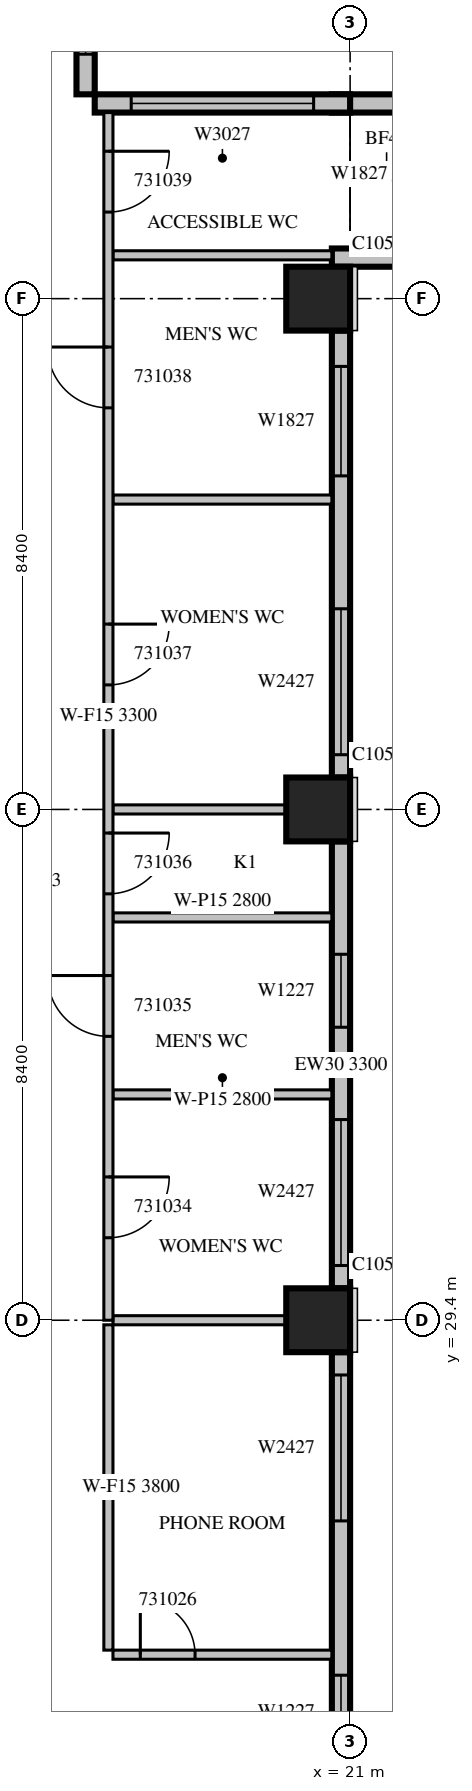
"""IFC4 building model, lengths in metres.
Left out: names, types, materials, properties, quantities, classifications, styles, units other than length and angle.
Written with IfcOpenShell. Run it as: python <this file> out.ifc"""

import sys

from ifc_helpers import new_model, si_unit, direction, frame, frame_2d, origin, origin_2d, place, context, subcontext, project, spatial, rectangle, extrude, source, transform, mapped, element, fill, save


model = new_model("IFC4")
c1 = context("Model", 3, precision=1e-05, world=origin(), true_north=direction((0.0, 1.0)))
c2 = subcontext(c1, "Body", "Model", "MODEL_VIEW")
j1 = project(units=[si_unit("LENGTHUNIT", "METRE"), si_unit("PLANEANGLEUNIT", "RADIAN")], contexts=[c1])
p1 = place(None, origin())
s1 = spatial("IfcSite", under=j1, at=p1, CompositionType="ELEMENT")
p2 = place(p1, origin())
s2 = spatial("IfcBuilding", under=s1, at=p2, CompositionType="ELEMENT")
p3 = place(p2, frame((0.0, 0.0, 141.3)))
s3 = spatial("IfcBuildingStorey", under=s2, at=p3, CompositionType="ELEMENT", Elevation=141.3)
m1 = source(origin(), c2, "Body", "SweptSolid", [
    extrude(rectangle(XDim=1.05, YDim=1.05, at=origin_2d()), origin(), (0.0, 0.0, 1.0), 4.2),
])
for number, where, z_axis, x_axis in (
    (1, (20.475, 29.4, 0.0), (0.0, 0.0, 1.0), (1.0, 0.0, 0.0)),
    (2, (20.475, 37.8, 0.0), (0.0, 0.0, 1.0), (1.0, 0.0, 0.0)),
    (3, (20.475, 46.2, 0.0), (0.0, 0.0, 1.0), (1.0, 0.0, 0.0)),
):
    element("IfcColumn", number, at=place(p3, frame(where, z_axis=z_axis, x_axis=x_axis)), inside=s3, PredefinedType="COLUMN", context=c2, shape_type="MappedRepresentation", body=[
        mapped(m1, transform((0.0, 0.0, 0.0), scale=1.0)),
    ])
m2 = source(origin(), c2, "Body", "SweptSolid", [
    extrude(rectangle(XDim=6.875, YDim=0.3, at=frame_2d((3.438, 0.0))), origin(), (0.0, 0.0, 1.0), 3.8),
])
p4 = place(p3, frame((20.85, 22.0, 0.0), z_axis=(0.0, 0.0, 1.0), x_axis=(0.0, 1.0, 0.0)))
e4 = element("IfcWall", 4, at=p4, inside=s3, PredefinedType="STANDARD", context=c2, shape_type="MappedRepresentation", body=[
    mapped(m2, transform((0.0, 0.0, 0.0), scale=1.0)),
])
m3 = source(origin(), c2, "Body", "SweptSolid", [
    extrude(rectangle(XDim=1.2, YDim=2.7, at=frame_2d((0.6, 1.35))), frame((0.0, 0.16, 0.0), z_axis=(0.0, -1.0, 0.0), x_axis=(1.0, 0.0, 0.0)), (0.0, 0.0, 1.0), 0.32),
])
p5 = place(p4, frame((0.362, 0.0, 0.6)))
e5 = element("IfcOpeningElement", 5, at=p5, cuts=e4, PredefinedType="OPENING", context=c2, shape_type="MappedRepresentation", body=[
    mapped(m3, transform((0.0, 0.0, 0.0), scale=1.0)),
])
m4 = source(origin(), c2, "Body", "SweptSolid", [
    extrude(rectangle(XDim=2.4, YDim=2.7, at=frame_2d((1.2, 1.35))), frame((0.0, 0.16, 0.0), z_axis=(0.0, -1.0, 0.0), x_axis=(1.0, 0.0, 0.0)), (0.0, 0.0, 1.0), 0.32),
])
p6 = place(p4, frame((4.1, 0.0, 0.6)))
e6 = element("IfcOpeningElement", 6, at=p6, cuts=e4, PredefinedType="OPENING", context=c2, shape_type="MappedRepresentation", body=[
    mapped(m4, transform((0.0, 0.0, 0.0), scale=1.0)),
])
m5 = source(origin(), c2, "Body", "SweptSolid", [
    extrude(rectangle(XDim=7.35, YDim=0.3, at=frame_2d((3.675, 0.0))), origin(), (0.0, 0.0, 1.0), 3.3),
])
p7 = place(p3, frame((20.85, 29.925, 0.0), z_axis=(0.0, 0.0, 1.0), x_axis=(0.0, 1.0, 0.0)))
e7 = element("IfcWall", 7, at=p7, inside=s3, PredefinedType="STANDARD", context=c2, shape_type="MappedRepresentation", body=[
    mapped(m5, transform((0.0, 0.0, 0.0), scale=1.0)),
])
p8 = place(p7, frame((0.375, 0.0, 0.6)))
e8 = element("IfcOpeningElement", 8, at=p8, cuts=e7, PredefinedType="OPENING", context=c2, shape_type="MappedRepresentation", body=[
    mapped(m4, transform((0.0, 0.0, 0.0), scale=1.0)),
])
p9 = place(p7, frame((4.293, 0.0, 0.6)))
e9 = element("IfcOpeningElement", 9, at=p9, cuts=e7, PredefinedType="OPENING", context=c2, shape_type="MappedRepresentation", body=[
    mapped(m3, transform((0.0, 0.0, 0.0), scale=1.0)),
])
m6 = source(origin(), c2, "Body", "SweptSolid", [
    extrude(rectangle(XDim=7.35, YDim=0.3, at=frame_2d((3.675, 0.0))), origin(), (0.0, 0.0, 1.0), 3.8),
])
p10 = place(p3, frame((20.85, 38.325, 0.0), z_axis=(0.0, 0.0, 1.0), x_axis=(0.0, 1.0, 0.0)))
e10 = element("IfcWall", 10, at=p10, inside=s3, PredefinedType="STANDARD", context=c2, shape_type="MappedRepresentation", body=[
    mapped(m6, transform((0.0, 0.0, 0.0), scale=1.0)),
])
p11 = place(p10, frame((0.375, 0.0, 0.6)))
e11 = element("IfcOpeningElement", 11, at=p11, cuts=e10, PredefinedType="OPENING", context=c2, shape_type="MappedRepresentation", body=[
    mapped(m4, transform((0.0, 0.0, 0.0), scale=1.0)),
])
m7 = source(origin(), c2, "Body", "SweptSolid", [
    extrude(rectangle(XDim=1.8, YDim=2.7, at=frame_2d((0.9, 1.35))), frame((0.0, 0.16, 0.0), z_axis=(0.0, -1.0, 0.0), x_axis=(1.0, 0.0, 0.0)), (0.0, 0.0, 1.0), 0.32),
])
p12 = place(p10, frame((4.96, 0.0, 0.6)))
e12 = element("IfcOpeningElement", 12, at=p12, cuts=e10, PredefinedType="OPENING", context=c2, shape_type="MappedRepresentation", body=[
    mapped(m7, transform((0.0, 0.0, 0.0), scale=1.0)),
])
m8 = source(origin(), c2, "Body", "SweptSolid", [
    extrude(rectangle(XDim=1.2, YDim=0.3, at=frame_2d((0.6, 0.0))), origin(), (0.0, 0.0, 1.0), 3.8),
])
for number, where, z_axis, x_axis in (
    (13, (20.7, 46.875, 0.0), (0.0, 0.0, 1.0), (1.0, 0.0, 0.0)),
    (14, (20.7, 49.41, 0.0), (0.0, 0.0, 1.0), (1.0, 0.0, 0.0)),
):
    element("IfcWall", number, at=place(p3, frame(where, z_axis=z_axis, x_axis=x_axis)), inside=s3, PredefinedType="STANDARD", context=c2, shape_type="MappedRepresentation", body=[
        mapped(m8, transform((0.0, 0.0, 0.0), scale=1.0)),
    ])
m9 = source(origin(), c2, "Body", "SweptSolid", [
    extrude(rectangle(XDim=4.2, YDim=0.3, at=frame_2d((2.1, 0.0))), origin(), (0.0, 0.0, 1.0), 3.8),
])
p13 = place(p3, frame((21.0, 49.41, 0.0), z_axis=(0.0, 0.0, 1.0), x_axis=(-1.0, 0.0, 0.0)))
e15 = element("IfcWall", 15, at=p13, inside=s3, PredefinedType="STANDARD", context=c2, shape_type="MappedRepresentation", body=[
    mapped(m9, transform((0.0, 0.0, 0.0), scale=1.0)),
])
m10 = source(origin(), c2, "Body", "SweptSolid", [
    extrude(rectangle(XDim=3.0, YDim=2.7, at=frame_2d((1.5, 1.35))), frame((0.0, 0.16, 0.0), z_axis=(0.0, -1.0, 0.0), x_axis=(1.0, 0.0, 0.0)), (0.0, 0.0, 1.0), 0.32),
])
p14 = place(p13, frame((0.6, 0.0, 0.6)))
e16 = element("IfcOpeningElement", 16, at=p14, cuts=e15, PredefinedType="OPENING", context=c2, shape_type="MappedRepresentation", body=[
    mapped(m10, transform((0.0, 0.0, 0.0), scale=1.0)),
])
m11 = source(origin(), c2, "Body", "SweptSolid", [
    extrude(rectangle(XDim=2.52, YDim=0.3, at=frame_2d((1.26, 0.0))), origin(), (0.0, 0.0, 1.0), 3.8),
])
p15 = place(p3, frame((16.65, 49.56, 0.0), z_axis=(0.0, 0.0, 1.0), x_axis=(0.0, 1.0, 0.0)))
e17 = element("IfcWall", 17, at=p15, inside=s3, PredefinedType="STANDARD", context=c2, shape_type="MappedRepresentation", body=[
    mapped(m11, transform((0.0, 0.0, 0.0), scale=1.0)),
])
p16 = place(p15, frame((0.66, 0.0, 0.6)))
e18 = element("IfcOpeningElement", 18, at=p16, cuts=e17, PredefinedType="OPENING", context=c2, shape_type="MappedRepresentation", body=[
    mapped(m3, transform((0.0, 0.0, 0.0), scale=1.0)),
])
m12 = source(origin(), c2, "Body", "SweptSolid", [
    extrude(rectangle(XDim=3.6, YDim=0.15, at=frame_2d((1.8, 0.0))), origin(), (0.0, 0.0, 1.0), 3.8),
])
p17 = place(p3, frame((17.1, 23.9, 0.0), z_axis=(0.0, 0.0, 1.0), x_axis=(1.0, 0.0, 0.0)))
e19 = element("IfcWall", 19, at=p17, inside=s3, PredefinedType="PARTITIONING", context=c2, shape_type="MappedRepresentation", body=[
    mapped(m12, transform((0.0, 0.0, 0.0), scale=1.0)),
])
m13 = source(origin(), c2, "Body", "SweptSolid", [
    extrude(rectangle(XDim=0.9, YDim=2.1, at=frame_2d((0.45, 1.05))), frame((0.0, 0.085, 0.0), z_axis=(0.0, -1.0, 0.0), x_axis=(1.0, 0.0, 0.0)), (0.0, 0.0, 1.0), 0.17),
])
p18 = place(p17, frame((0.45, 0.0, 0.0)))
e20 = element("IfcOpeningElement", 20, at=p18, cuts=e19, PredefinedType="OPENING", context=c2, shape_type="MappedRepresentation", body=[
    mapped(m13, transform((0.0, 0.0, 0.0), scale=1.0)),
])
m14 = source(origin(), c2, "Body", "SweptSolid", [
    extrude(rectangle(XDim=5.35, YDim=0.15, at=frame_2d((2.675, 0.0))), origin(), (0.0, 0.0, 1.0), 3.8),
])
p19 = place(p3, frame((17.025, 29.325, 0.0), z_axis=(0.0, 0.0, 1.0), x_axis=(0.0, -1.0, 0.0)))
e21 = element("IfcWall", 21, at=p19, inside=s3, PredefinedType="PARTITIONING", context=c2, shape_type="MappedRepresentation", body=[
    mapped(m14, transform((0.0, 0.0, 0.0), scale=1.0)),
])
m15 = source(origin(), c2, "Body", "SweptSolid", [
    extrude(rectangle(XDim=2.851, YDim=0.15, at=frame_2d((1.425, 0.0))), origin(), (0.0, 0.0, 1.0), 3.8),
])
p20 = place(p3, frame((19.951, 29.4, 0.0), z_axis=(0.0, 0.0, 1.0), x_axis=(-1.0, 0.0, 0.0)))
e22 = element("IfcWall", 22, at=p20, inside=s3, PredefinedType="PARTITIONING", context=c2, shape_type="MappedRepresentation", body=[
    mapped(m15, transform((0.0, 0.0, 0.0), scale=1.0)),
])
m16 = source(origin(), c2, "Body", "SweptSolid", [
    extrude(rectangle(XDim=3.6, YDim=0.15, at=frame_2d((1.8, 0.0))), origin(), (0.0, 0.0, 1.0), 2.8),
])
for number, where, z_axis, x_axis in (
    (23, (17.1, 33.113, 0.0), (0.0, 0.0, 1.0), (1.0, 0.0, 0.0)),
    (24, (17.1, 36.024, 0.0), (0.0, 0.0, 1.0), (1.0, 0.0, 0.0)),
):
    element("IfcWall", number, at=place(p3, frame(where, z_axis=z_axis, x_axis=x_axis)), inside=s3, PredefinedType="PARTITIONING", context=c2, shape_type="MappedRepresentation", body=[
        mapped(m16, transform((0.0, 0.0, 0.0), scale=1.0)),
    ])
for number, where, z_axis, x_axis in (
    (25, (17.1, 42.896, 0.0), (0.0, 0.0, 1.0), (1.0, 0.0, 0.0)),
    (26, (17.1, 46.913, 0.0), (0.0, 0.0, 1.0), (1.0, 0.0, 0.0)),
):
    element("IfcWall", number, at=place(p3, frame(where, z_axis=z_axis, x_axis=x_axis)), inside=s3, PredefinedType="PARTITIONING", context=c2, shape_type="MappedRepresentation", body=[
        mapped(m12, transform((0.0, 0.0, 0.0), scale=1.0)),
    ])
p21 = place(p3, frame((19.951, 37.8, 0.0), z_axis=(0.0, 0.0, 1.0), x_axis=(-1.0, 0.0, 0.0)))
e27 = element("IfcWall", 27, at=p21, inside=s3, PredefinedType="PARTITIONING", context=c2, shape_type="MappedRepresentation", body=[
    mapped(m15, transform((0.0, 0.0, 0.0), scale=1.0)),
])
m17 = source(origin(), c2, "Body", "SweptSolid", [
    extrude(rectangle(XDim=19.86, YDim=0.15, at=frame_2d((9.93, 0.0))), origin(), (0.0, 0.0, 1.0), 3.3),
])
p22 = place(p3, frame((17.025, 49.26, 0.0), z_axis=(0.0, 0.0, 1.0), x_axis=(0.0, -1.0, 0.0)))
e28 = element("IfcWall", 28, at=p22, inside=s3, PredefinedType="PARTITIONING", context=c2, shape_type="MappedRepresentation", body=[
    mapped(m17, transform((0.0, 0.0, 0.0), scale=1.0)),
])
m18 = source(origin(), c2, "Body", "SweptSolid", [
    extrude(rectangle(XDim=1.0, YDim=2.1, at=frame_2d((0.5, 1.05))), frame((0.0, 0.085, 0.0), z_axis=(0.0, -1.0, 0.0), x_axis=(1.0, 0.0, 0.0)), (0.0, 0.0, 1.0), 0.17),
])
p23 = place(p22, frame((17.503, 0.0, 0.0)))
e29 = element("IfcOpeningElement", 29, at=p23, cuts=e28, PredefinedType="OPENING", context=c2, shape_type="MappedRepresentation", body=[
    mapped(m18, transform((0.0, 0.0, 0.0), scale=1.0)),
])
p24 = place(p22, frame((14.191, 0.0, 0.0)))
e30 = element("IfcOpeningElement", 30, at=p24, cuts=e28, PredefinedType="OPENING", context=c2, shape_type="MappedRepresentation", body=[
    mapped(m18, transform((0.0, 0.0, 0.0), scale=1.0)),
])
p25 = place(p22, frame((11.848, 0.0, 0.0)))
e31 = element("IfcOpeningElement", 31, at=p25, cuts=e28, PredefinedType="OPENING", context=c2, shape_type="MappedRepresentation", body=[
    mapped(m18, transform((0.0, 0.0, 0.0), scale=1.0)),
])
p26 = place(p22, frame((8.412, 0.0, 0.0)))
e32 = element("IfcOpeningElement", 32, at=p26, cuts=e28, PredefinedType="OPENING", context=c2, shape_type="MappedRepresentation", body=[
    mapped(m18, transform((0.0, 0.0, 0.0), scale=1.0)),
])
p27 = place(p22, frame((3.856, 0.0, 0.0)))
e33 = element("IfcOpeningElement", 33, at=p27, cuts=e28, PredefinedType="OPENING", context=c2, shape_type="MappedRepresentation", body=[
    mapped(m18, transform((0.0, 0.0, 0.0), scale=1.0)),
])
p28 = place(p22, frame((0.636, 0.0, 0.0)))
e34 = element("IfcOpeningElement", 34, at=p28, cuts=e28, PredefinedType="OPENING", context=c2, shape_type="MappedRepresentation", body=[
    mapped(m18, transform((0.0, 0.0, 0.0), scale=1.0)),
])
m19 = source(origin(), c2, "Body", "SweptSolid", [
    extrude(rectangle(XDim=1.2, YDim=2.7, at=frame_2d((0.6, 1.35))), frame((0.0, 0.03, 0.0), z_axis=(0.0, -1.0, 0.0), x_axis=(1.0, 0.0, 0.0)), (0.0, 0.0, 1.0), 0.06),
])
p29 = place(p5, origin())
e35 = element("IfcWindow", 35, at=p29, inside=s3, PartitioningType="SINGLE_PANEL", PredefinedType="WINDOW", context=c2, shape_type="MappedRepresentation", body=[
    mapped(m19, transform((0.0, 0.0, 0.0), scale=1.0)),
])
fill(e5, e35)
m20 = source(origin(), c2, "Body", "SweptSolid", [
    extrude(rectangle(XDim=2.4, YDim=2.7, at=frame_2d((1.2, 1.35))), frame((0.0, 0.03, 0.0), z_axis=(0.0, -1.0, 0.0), x_axis=(1.0, 0.0, 0.0)), (0.0, 0.0, 1.0), 0.06),
])
p30 = place(p6, origin())
e36 = element("IfcWindow", 36, at=p30, inside=s3, PartitioningType="SINGLE_PANEL", PredefinedType="WINDOW", context=c2, shape_type="MappedRepresentation", body=[
    mapped(m20, transform((0.0, 0.0, 0.0), scale=1.0)),
])
fill(e6, e36)
p31 = place(p8, origin())
e37 = element("IfcWindow", 37, at=p31, inside=s3, PartitioningType="SINGLE_PANEL", PredefinedType="WINDOW", context=c2, shape_type="MappedRepresentation", body=[
    mapped(m20, transform((0.0, 0.0, 0.0), scale=1.0)),
])
fill(e8, e37)
p32 = place(p9, origin())
e38 = element("IfcWindow", 38, at=p32, inside=s3, PartitioningType="SINGLE_PANEL", PredefinedType="WINDOW", context=c2, shape_type="MappedRepresentation", body=[
    mapped(m19, transform((0.0, 0.0, 0.0), scale=1.0)),
])
fill(e9, e38)
p33 = place(p11, origin())
e39 = element("IfcWindow", 39, at=p33, inside=s3, PartitioningType="SINGLE_PANEL", PredefinedType="WINDOW", context=c2, shape_type="MappedRepresentation", body=[
    mapped(m20, transform((0.0, 0.0, 0.0), scale=1.0)),
])
fill(e11, e39)
m21 = source(origin(), c2, "Body", "SweptSolid", [
    extrude(rectangle(XDim=1.8, YDim=2.7, at=frame_2d((0.9, 1.35))), frame((0.0, 0.03, 0.0), z_axis=(0.0, -1.0, 0.0), x_axis=(1.0, 0.0, 0.0)), (0.0, 0.0, 1.0), 0.06),
])
p34 = place(p12, origin())
e40 = element("IfcWindow", 40, at=p34, inside=s3, PartitioningType="SINGLE_PANEL", PredefinedType="WINDOW", context=c2, shape_type="MappedRepresentation", body=[
    mapped(m21, transform((0.0, 0.0, 0.0), scale=1.0)),
])
fill(e12, e40)
m22 = source(origin(), c2, "Body", "SweptSolid", [
    extrude(rectangle(XDim=3.0, YDim=2.7, at=frame_2d((1.5, 1.35))), frame((0.0, 0.03, 0.0), z_axis=(0.0, -1.0, 0.0), x_axis=(1.0, 0.0, 0.0)), (0.0, 0.0, 1.0), 0.06),
])
p35 = place(p14, origin())
e41 = element("IfcWindow", 41, at=p35, inside=s3, PartitioningType="SINGLE_PANEL", PredefinedType="WINDOW", context=c2, shape_type="MappedRepresentation", body=[
    mapped(m22, transform((0.0, 0.0, 0.0), scale=1.0)),
])
fill(e16, e41)
p36 = place(p16, origin())
e42 = element("IfcWindow", 42, at=p36, inside=s3, PartitioningType="SINGLE_PANEL", PredefinedType="WINDOW", context=c2, shape_type="MappedRepresentation", body=[
    mapped(m19, transform((0.0, 0.0, 0.0), scale=1.0)),
])
fill(e18, e42)
m23 = source(origin(), c2, "Body", "SweptSolid", [
    extrude(rectangle(XDim=0.9, YDim=2.1, at=frame_2d((0.45, 1.05))), frame((0.0, 0.025, 0.0), z_axis=(0.0, -1.0, 0.0), x_axis=(1.0, 0.0, 0.0)), (0.0, 0.0, 1.0), 0.05),
])
p37 = place(p18, origin())
e43 = element("IfcDoor", 43, at=p37, inside=s3, OperationType="SINGLE_SWING_LEFT", PredefinedType="DOOR", context=c2, shape_type="MappedRepresentation", body=[
    mapped(m23, transform((0.0, 0.0, 0.0), scale=1.0)),
])
fill(e20, e43)
m24 = source(origin(), c2, "Body", "SweptSolid", [
    extrude(rectangle(XDim=1.0, YDim=2.1, at=frame_2d((0.5, 1.05))), frame((0.0, 0.025, 0.0), z_axis=(0.0, -1.0, 0.0), x_axis=(1.0, 0.0, 0.0)), (0.0, 0.0, 1.0), 0.05),
])
p38 = place(p23, origin())
e44 = element("IfcDoor", 44, at=p38, inside=s3, OperationType="SINGLE_SWING_LEFT", PredefinedType="DOOR", context=c2, shape_type="MappedRepresentation", body=[
    mapped(m24, transform((0.0, 0.0, 0.0), scale=1.0)),
])
fill(e29, e44)
p39 = place(p24, origin())
e45 = element("IfcDoor", 45, at=p39, inside=s3, OperationType="SINGLE_SWING_RIGHT", PredefinedType="DOOR", context=c2, shape_type="MappedRepresentation", body=[
    mapped(m24, transform((0.0, 0.0, 0.0), scale=1.0)),
])
fill(e30, e45)
p40 = place(p25, origin())
e46 = element("IfcDoor", 46, at=p40, inside=s3, OperationType="SINGLE_SWING_LEFT", PredefinedType="DOOR", context=c2, shape_type="MappedRepresentation", body=[
    mapped(m24, transform((0.0, 0.0, 0.0), scale=1.0)),
])
fill(e31, e46)
p41 = place(p26, origin())
e47 = element("IfcDoor", 47, at=p41, inside=s3, OperationType="SINGLE_SWING_LEFT", PredefinedType="DOOR", context=c2, shape_type="MappedRepresentation", body=[
    mapped(m24, transform((0.0, 0.0, 0.0), scale=1.0)),
])
fill(e32, e47)
p42 = place(p27, origin())
e48 = element("IfcDoor", 48, at=p42, inside=s3, OperationType="SINGLE_SWING_RIGHT", PredefinedType="DOOR", context=c2, shape_type="MappedRepresentation", body=[
    mapped(m24, transform((0.0, 0.0, 0.0), scale=1.0)),
])
fill(e33, e48)
p43 = place(p28, origin())
e49 = element("IfcDoor", 49, at=p43, inside=s3, OperationType="SINGLE_SWING_LEFT", PredefinedType="DOOR", context=c2, shape_type="MappedRepresentation", body=[
    mapped(m24, transform((0.0, 0.0, 0.0), scale=1.0)),
])
fill(e34, e49)
save(model, sys.argv[1])
